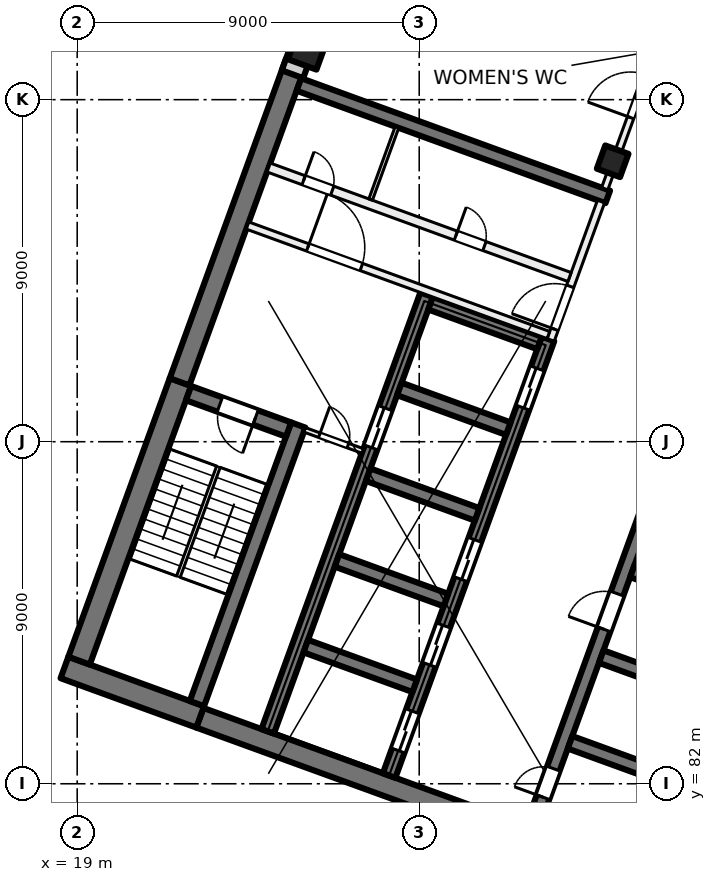
"""IFC4 building model, lengths in metres.
Left out: names, types, materials, properties, quantities, classifications, styles, units other than length and angle.
Written with IfcOpenShell. Run it as: python <this file> out.ifc"""

import sys

from ifc_helpers import new_model, si_unit, direction, frame, frame_2d, origin, origin_2d, place, context, subcontext, project, spatial, rectangle, extrude, element, fill, save


model = new_model("IFC4")
c1 = context("Model", 3, precision=1e-05, world=origin(), true_north=direction((0.0, 1.0)))
c2 = subcontext(c1, "Body", "Model", "MODEL_VIEW")
j1 = project(units=[si_unit("LENGTHUNIT", "METRE"), si_unit("PLANEANGLEUNIT", "RADIAN")], contexts=[c1])
p1 = place(None, origin())
s1 = spatial("IfcSite", under=j1, at=p1, CompositionType="ELEMENT")
p2 = place(p1, origin())
s2 = spatial("IfcBuilding", under=s1, at=p2, CompositionType="ELEMENT")
p3 = place(p2, frame((0.0, 0.0, 170.5)))
s3 = spatial("IfcBuildingStorey", under=s2, at=p3, CompositionType="ELEMENT", Elevation=170.5)
p4 = place(p3, frame((33.091, 98.379, 0.0), z_axis=(0.0, 0.0, 1.0), x_axis=(-0.342020143326, -0.939692620786, 0.0)))
e1 = element("IfcColumn", 1, at=p4, inside=s3, PredefinedType="COLUMN", context=c2, shape_type="SweptSolid", body=[
    extrude(rectangle(XDim=0.65, YDim=0.65, at=origin_2d()), origin(), (0.0, 0.0, 1.0), 4.0),
])
p5 = place(p3, frame((25.056, 101.303, 0.0), z_axis=(0.0, 0.0, 1.0), x_axis=(-0.342020143326, -0.939692620786, 0.0)))
e2 = element("IfcColumn", 2, at=p5, inside=s3, PredefinedType="COLUMN", context=c2, shape_type="SweptSolid", body=[
    extrude(rectangle(XDim=0.8, YDim=0.8, at=origin_2d()), origin(), (0.0, 0.0, 1.0), 4.0),
])
p6 = place(p3, frame((35.759, 78.811, 0.0), z_axis=(0.0, 0.0, 1.0), x_axis=(-0.939692894512, 0.342019391267, 0.0)))
e3 = element("IfcWall", 3, at=p6, inside=s3, PredefinedType="SHEAR", context=c2, shape_type="SweptSolid", body=[
    extrude(rectangle(XDim=14.4, YDim=0.55, at=frame_2d((7.2, 0.0))), origin(), (0.0, 0.0, 1.0), 4.0),
])
p7 = place(p3, frame((22.236, 83.76, 0.0), z_axis=(0.0, 0.0, 1.0), x_axis=(-0.939680822529, 0.342052557032, 0.0)))
e4 = element("IfcWall", 4, at=p7, inside=s3, PredefinedType="SHEAR", context=c2, shape_type="SweptSolid", body=[
    extrude(rectangle(XDim=3.8, YDim=0.6, at=frame_2d((1.9, 0.0))), origin(), (0.0, 0.0, 1.0), 4.0),
])
p8 = place(p3, frame((19.05, 85.239, 0.0), z_axis=(0.0, 0.0, 1.0), x_axis=(0.342016982193, 0.939693771338, 0.0)))
e5 = element("IfcWall", 5, at=p8, inside=s3, PredefinedType="SHEAR", context=c2, shape_type="SweptSolid", body=[
    extrude(rectangle(XDim=7.8, YDim=0.6, at=frame_2d((3.9, 0.0))), origin(), (0.0, 0.0, 1.0), 4.0),
])
p9 = place(p3, frame((21.694, 92.577, 0.0), z_axis=(0.0, 0.0, 1.0), x_axis=(0.342010253184, 0.939696220444, 0.0)))
e6 = element("IfcWall", 6, at=p9, inside=s3, PredefinedType="SHEAR", context=c2, shape_type="SweptSolid", body=[
    extrude(rectangle(XDim=8.95, YDim=0.55, at=frame_2d((4.475, 0.0))), origin(), (0.0, 0.0, 1.0), 4.0),
])
p10 = place(p3, frame((22.15, 84.11, 0.0), z_axis=(0.0, 0.0, 1.0), x_axis=(0.342016982193, 0.939693771338, 0.0)))
e7 = element("IfcWall", 7, at=p10, inside=s3, PredefinedType="SHEAR", context=c2, shape_type="SweptSolid", body=[
    extrude(rectangle(XDim=7.8, YDim=0.4, at=frame_2d((3.9, 0.0))), origin(), (0.0, 0.0, 1.0), 4.0),
])
p11 = place(p3, frame((24.562, 91.32, 0.0), z_axis=(0.0, 0.0, 1.0), x_axis=(-0.939717030584, 0.341953070509, 0.0)))
e8 = element("IfcWall", 8, at=p11, inside=s3, PredefinedType="SHEAR", context=c2, shape_type="SweptSolid", body=[
    extrude(rectangle(XDim=2.8, YDim=0.4, at=frame_2d((1.4, 0.0))), origin(), (0.0, 0.0, 1.0), 4.0),
])
p12 = place(p11, frame((0.925, 0.0, 0.0)))
e9 = element("IfcOpeningElement", 9, at=p12, cuts=e8, PredefinedType="OPENING", context=c2, shape_type="SweptSolid", body=[
    extrude(rectangle(XDim=1.0, YDim=2.1, at=frame_2d((0.5, 1.05))), frame((0.0, 0.21, 0.0), z_axis=(0.0, -1.0, 0.0), x_axis=(1.0, 0.0, 0.0)), (0.0, 0.0, 1.0), 0.42),
])
p13 = place(p3, frame((30.967, 80.848, 0.0), z_axis=(0.0, 0.0, 1.0), x_axis=(0.34201563943, 0.939694260058, 0.0)))
e10 = element("IfcWall", 10, at=p13, inside=s3, PredefinedType="SHEAR", context=c2, shape_type="SweptSolid", body=[
    extrude(rectangle(XDim=12.225, YDim=0.35, at=frame_2d((6.113, 0.0))), origin(), (0.0, 0.0, 1.0), 4.0),
])
p14 = place(p13, frame((0.85, 0.0, 0.0)))
e11 = element("IfcOpeningElement", 11, at=p14, cuts=e10, PredefinedType="OPENING", context=c2, shape_type="SweptSolid", body=[
    extrude(rectangle(XDim=0.8, YDim=2.1, at=frame_2d((0.4, 1.05))), frame((0.0, 0.185, 0.0), z_axis=(0.0, -1.0, 0.0), x_axis=(1.0, 0.0, 0.0)), (0.0, 0.0, 1.0), 0.37),
])
p15 = place(p13, frame((5.55, 0.0, 0.0)))
e12 = element("IfcOpeningElement", 12, at=p15, cuts=e10, PredefinedType="OPENING", context=c2, shape_type="SweptSolid", body=[
    extrude(rectangle(XDim=1.0, YDim=2.1, at=frame_2d((0.5, 1.05))), frame((0.0, 0.185, 0.0), z_axis=(0.0, -1.0, 0.0), x_axis=(1.0, 0.0, 0.0)), (0.0, 0.0, 1.0), 0.37),
])
p16 = place(p3, frame((34.835, 82.047, 0.0), z_axis=(0.0, 0.0, 1.0), x_axis=(-0.939683528043, 0.3420451244, 0.0)))
e13 = element("IfcWall", 13, at=p16, inside=s3, PredefinedType="SHEAR", context=c2, shape_type="SweptSolid", body=[
    extrude(rectangle(XDim=3.05, YDim=0.35, at=frame_2d((1.525, 0.0))), origin(), (0.0, 0.0, 1.0), 4.0),
])
p17 = place(p3, frame((35.656, 84.303, 0.0), z_axis=(0.0, 0.0, 1.0), x_axis=(-0.939709254651, 0.341974438698, 0.0)))
e14 = element("IfcWall", 14, at=p17, inside=s3, PredefinedType="SHEAR", context=c2, shape_type="SweptSolid", body=[
    extrude(rectangle(XDim=3.05, YDim=0.35, at=frame_2d((1.525, 0.0))), origin(), (0.0, 0.0, 1.0), 4.0),
])
p18 = place(p3, frame((36.477, 86.558, 0.0), z_axis=(0.0, 0.0, 1.0), x_axis=(-0.939683528043, 0.3420451244, 0.0)))
e15 = element("IfcWall", 15, at=p18, inside=s3, PredefinedType="SHEAR", context=c2, shape_type="SweptSolid", body=[
    extrude(rectangle(XDim=3.05, YDim=0.35, at=frame_2d((1.525, 0.0))), origin(), (0.0, 0.0, 1.0), 4.0),
])
p19 = place(p3, frame((27.208, 82.216, 0.0), z_axis=(0.0, 0.0, 1.0), x_axis=(0.34201563943, 0.939694260058, 0.0)))
e16 = element("IfcWall", 16, at=p19, inside=s3, PredefinedType="SHEAR", context=c2, shape_type="SweptSolid", body=[
    extrude(rectangle(XDim=12.225, YDim=0.35, at=frame_2d((6.113, 0.0))), origin(), (0.0, 0.0, 1.0), 4.0),
])
p20 = place(p19, frame((0.7, 0.0, 0.0)))
e17 = element("IfcOpeningElement", 17, at=p20, cuts=e16, PredefinedType="OPENING", context=c2, shape_type="SweptSolid", body=[
    extrude(rectangle(XDim=1.1, YDim=2.1, at=frame_2d((0.55, 1.05))), frame((0.0, 0.185, 0.0), z_axis=(0.0, -1.0, 0.0), x_axis=(1.0, 0.0, 0.0)), (0.0, 0.0, 1.0), 0.37),
])
p21 = place(p19, frame((3.1, 0.0, 0.0)))
e18 = element("IfcOpeningElement", 18, at=p21, cuts=e16, PredefinedType="OPENING", context=c2, shape_type="SweptSolid", body=[
    extrude(rectangle(XDim=1.1, YDim=2.1, at=frame_2d((0.55, 1.05))), frame((0.0, 0.185, 0.0), z_axis=(0.0, -1.0, 0.0), x_axis=(1.0, 0.0, 0.0)), (0.0, 0.0, 1.0), 0.37),
])
p22 = place(p19, frame((5.5, 0.0, 0.0)))
e19 = element("IfcOpeningElement", 19, at=p22, cuts=e16, PredefinedType="OPENING", context=c2, shape_type="SweptSolid", body=[
    extrude(rectangle(XDim=1.1, YDim=2.1, at=frame_2d((0.55, 1.05))), frame((0.0, 0.185, 0.0), z_axis=(0.0, -1.0, 0.0), x_axis=(1.0, 0.0, 0.0)), (0.0, 0.0, 1.0), 0.37),
])
p23 = place(p19, frame((10.3, 0.0, 0.0)))
e20 = element("IfcOpeningElement", 20, at=p23, cuts=e16, PredefinedType="OPENING", context=c2, shape_type="SweptSolid", body=[
    extrude(rectangle(XDim=1.1, YDim=2.1, at=frame_2d((0.55, 1.05))), frame((0.0, 0.185, 0.0), z_axis=(0.0, -1.0, 0.0), x_axis=(1.0, 0.0, 0.0)), (0.0, 0.0, 1.0), 0.37),
])
p24 = place(p3, frame((24.013, 83.379, 0.0), z_axis=(0.0, 0.0, 1.0), x_axis=(0.34201563943, 0.939694260058, 0.0)))
e21 = element("IfcWall", 21, at=p24, inside=s3, PredefinedType="SHEAR", context=c2, shape_type="SweptSolid", body=[
    extrude(rectangle(XDim=12.225, YDim=0.35, at=frame_2d((6.113, 0.0))), origin(), (0.0, 0.0, 1.0), 4.0),
])
p25 = place(p24, frame((7.95, 0.0, 0.0)))
e22 = element("IfcOpeningElement", 22, at=p25, cuts=e21, PredefinedType="OPENING", context=c2, shape_type="SweptSolid", body=[
    extrude(rectangle(XDim=1.1, YDim=2.1, at=frame_2d((0.55, 1.05))), frame((0.0, 0.185, 0.0), z_axis=(0.0, -1.0, 0.0), x_axis=(1.0, 0.0, 0.0)), (0.0, 0.0, 1.0), 0.37),
])
for number, where, z_axis, x_axis in (
    (23, (27.881, 84.578, 0.0), (0.0, 0.0, 1.0), (-0.94, 0.342, 0.0)),
    (24, (28.702, 86.833, 0.0), (0.0, 0.0, 1.0), (-0.94, 0.342, 0.0)),
    (25, (29.523, 89.089, 0.0), (0.0, 0.0, 1.0), (-0.94, 0.342, 0.0)),
):
    element("IfcWall", number, at=place(p3, frame(where, z_axis=z_axis, x_axis=x_axis)), inside=s3, PredefinedType="SHEAR", context=c2, shape_type="SweptSolid", body=[
        extrude(rectangle(XDim=3.05, YDim=0.35, at=frame_2d((1.525, 0.0))), origin(), (0.0, 0.0, 1.0), 4.0),
    ])
p26 = place(p3, frame((30.344, 91.344, 0.0), z_axis=(0.0, 0.0, 1.0), x_axis=(-0.939709254651, 0.341974438698, 0.0)))
e26 = element("IfcWall", 26, at=p26, inside=s3, PredefinedType="SHEAR", context=c2, shape_type="SweptSolid", body=[
    extrude(rectangle(XDim=3.05, YDim=0.35, at=frame_2d((1.525, 0.0))), origin(), (0.0, 0.0, 1.0), 4.0),
])
p27 = place(p3, frame((31.165, 93.599, 0.0), z_axis=(0.0, 0.0, 1.0), x_axis=(-0.939683528043, 0.3420451244, 0.0)))
e27 = element("IfcWall", 27, at=p27, inside=s3, PredefinedType="SHEAR", context=c2, shape_type="SweptSolid", body=[
    extrude(rectangle(XDim=3.05, YDim=0.35, at=frame_2d((1.525, 0.0))), origin(), (0.0, 0.0, 1.0), 4.0),
])
p28 = place(p3, frame((32.962, 97.441, 0.0), z_axis=(0.0, 0.0, 1.0), x_axis=(-0.939689545667, 0.342028592028, 0.0)))
e28 = element("IfcWall", 28, at=p28, inside=s3, PredefinedType="SHEAR", context=c2, shape_type="SweptSolid", body=[
    extrude(rectangle(XDim=8.65, YDim=0.35, at=frame_2d((4.325, 0.0))), origin(), (0.0, 0.0, 1.0), 4.0),
])
p29 = place(p3, frame((24.666, 100.669, 0.0), z_axis=(0.0, 0.0, 1.0), x_axis=(0.34201964167, 0.939692803373, 0.0)))
e29 = element("IfcWall", 29, at=p29, inside=s3, PredefinedType="SOLIDWALL", context=c2, shape_type="SweptSolid", body=[
    extrude(rectangle(XDim=32.884, YDim=0.6, at=frame_2d((16.442, 0.0))), origin(), (0.0, 0.0, 1.0), 3.625),
])
p30 = place(p29, frame((1.48, 0.0, 0.9)))
e30 = element("IfcOpeningElement", 30, at=p30, cuts=e29, PredefinedType="OPENING", context=c2, shape_type="SweptSolid", body=[
    extrude(rectangle(XDim=3.0, YDim=2.4, at=frame_2d((1.5, 1.2))), frame((0.0, 0.31, 0.0), z_axis=(0.0, -1.0, 0.0), x_axis=(1.0, 0.0, 0.0)), (0.0, 0.0, 1.0), 0.62),
])
p31 = place(p29, frame((5.98, 0.0, 0.9)))
e31 = element("IfcOpeningElement", 31, at=p31, cuts=e29, PredefinedType="OPENING", context=c2, shape_type="SweptSolid", body=[
    extrude(rectangle(XDim=3.0, YDim=2.4, at=frame_2d((1.5, 1.2))), frame((0.0, 0.31, 0.0), z_axis=(0.0, -1.0, 0.0), x_axis=(1.0, 0.0, 0.0)), (0.0, 0.0, 1.0), 0.62),
])
p32 = place(p29, frame((10.48, 0.0, 0.9)))
e32 = element("IfcOpeningElement", 32, at=p32, cuts=e29, PredefinedType="OPENING", context=c2, shape_type="SweptSolid", body=[
    extrude(rectangle(XDim=3.0, YDim=2.4, at=frame_2d((1.5, 1.2))), frame((0.0, 0.31, 0.0), z_axis=(0.0, -1.0, 0.0), x_axis=(1.0, 0.0, 0.0)), (0.0, 0.0, 1.0), 0.62),
])
p33 = place(p29, frame((14.98, 0.0, 0.9)))
e33 = element("IfcOpeningElement", 33, at=p33, cuts=e29, PredefinedType="OPENING", context=c2, shape_type="SweptSolid", body=[
    extrude(rectangle(XDim=3.0, YDim=2.4, at=frame_2d((1.5, 1.2))), frame((0.0, 0.31, 0.0), z_axis=(0.0, -1.0, 0.0), x_axis=(1.0, 0.0, 0.0)), (0.0, 0.0, 1.0), 0.62),
])
p34 = place(p29, frame((19.48, 0.0, 0.9)))
e34 = element("IfcOpeningElement", 34, at=p34, cuts=e29, PredefinedType="OPENING", context=c2, shape_type="SweptSolid", body=[
    extrude(rectangle(XDim=3.0, YDim=2.4, at=frame_2d((1.5, 1.2))), frame((0.0, 0.31, 0.0), z_axis=(0.0, -1.0, 0.0), x_axis=(1.0, 0.0, 0.0)), (0.0, 0.0, 1.0), 0.62),
])
p35 = place(p29, frame((23.98, 0.0, 0.9)))
e35 = element("IfcOpeningElement", 35, at=p35, cuts=e29, PredefinedType="OPENING", context=c2, shape_type="SweptSolid", body=[
    extrude(rectangle(XDim=3.0, YDim=2.4, at=frame_2d((1.5, 1.2))), frame((0.0, 0.31, 0.0), z_axis=(0.0, -1.0, 0.0), x_axis=(1.0, 0.0, 0.0)), (0.0, 0.0, 1.0), 0.62),
])
p36 = place(p29, frame((28.48, 0.0, 0.9)))
e36 = element("IfcOpeningElement", 36, at=p36, cuts=e29, PredefinedType="OPENING", context=c2, shape_type="SweptSolid", body=[
    extrude(rectangle(XDim=3.0, YDim=2.4, at=frame_2d((1.5, 1.2))), frame((0.0, 0.31, 0.0), z_axis=(0.0, -1.0, 0.0), x_axis=(1.0, 0.0, 0.0)), (0.0, 0.0, 1.0), 0.62),
])
p37 = place(p3, frame((31.459, 93.678, 0.0), z_axis=(0.0, 0.0, 1.0), x_axis=(0.341985870128, 0.939705094502, 0.0)))
e37 = element("IfcWall", 37, at=p37, inside=s3, PredefinedType="PARTITIONING", context=c2, shape_type="SweptSolid", body=[
    extrude(rectangle(XDim=3.875, YDim=0.2, at=frame_2d((1.938, 0.0))), origin(), (0.0, 0.0, 1.0), 3.625),
])
p38 = place(p37, frame((0.3, 0.0, 0.0)))
e38 = element("IfcOpeningElement", 38, at=p38, cuts=e37, PredefinedType="OPENING", context=c2, shape_type="SweptSolid", body=[
    extrude(rectangle(XDim=1.2, YDim=2.1, at=frame_2d((0.6, 1.05))), frame((0.0, 0.11, 0.0), z_axis=(0.0, -1.0, 0.0), x_axis=(1.0, 0.0, 0.0)), (0.0, 0.0, 1.0), 0.22),
])
p39 = place(p3, frame((23.483, 96.688, 0.0), z_axis=(0.0, 0.0, 1.0), x_axis=(0.939691007314, -0.342024576271, 0.0)))
e39 = element("IfcWall", 39, at=p39, inside=s3, PredefinedType="PARTITIONING", context=c2, shape_type="SweptSolid", body=[
    extrude(rectangle(XDim=8.425, YDim=0.2, at=frame_2d((4.212, 0.0))), origin(), (0.0, 0.0, 1.0), 3.625),
])
p40 = place(p39, frame((1.688, 0.0, 0.0)))
e40 = element("IfcOpeningElement", 40, at=p40, cuts=e39, PredefinedType="OPENING", context=c2, shape_type="SweptSolid", body=[
    extrude(rectangle(XDim=1.5, YDim=2.1, at=frame_2d((0.75, 1.05))), frame((0.0, 0.11, 0.0), z_axis=(0.0, -1.0, 0.0), x_axis=(1.0, 0.0, 0.0)), (0.0, 0.0, 1.0), 0.22),
])
p41 = place(p3, frame((24.039, 98.215, 0.0), z_axis=(0.0, 0.0, 1.0), x_axis=(0.939687617333, -0.342033889887, 0.0)))
e41 = element("IfcWall", 41, at=p41, inside=s3, PredefinedType="PARTITIONING", context=c2, shape_type="SweptSolid", body=[
    extrude(rectangle(XDim=8.425, YDim=0.25, at=frame_2d((4.212, 0.0))), origin(), (0.0, 0.0, 1.0), 3.625),
])
p42 = place(p41, frame((5.242, 0.0, 0.0)))
e42 = element("IfcOpeningElement", 42, at=p42, cuts=e41, PredefinedType="OPENING", context=c2, shape_type="SweptSolid", body=[
    extrude(rectangle(XDim=0.8, YDim=2.1, at=frame_2d((0.4, 1.05))), frame((0.0, 0.135, 0.0), z_axis=(0.0, -1.0, 0.0), x_axis=(1.0, 0.0, 0.0)), (0.0, 0.0, 1.0), 0.27),
])
p43 = place(p41, frame((0.98, 0.0, 0.0)))
e43 = element("IfcOpeningElement", 43, at=p43, cuts=e41, PredefinedType="OPENING", context=c2, shape_type="SweptSolid", body=[
    extrude(rectangle(XDim=0.8, YDim=2.1, at=frame_2d((0.4, 1.05))), frame((0.0, 0.135, 0.0), z_axis=(0.0, -1.0, 0.0), x_axis=(1.0, 0.0, 0.0)), (0.0, 0.0, 1.0), 0.27),
])
p44 = place(p3, frame((24.985, 91.312, 0.0), z_axis=(0.0, 0.0, 1.0), x_axis=(0.939705651352, -0.341984340019, 0.0)))
e44 = element("IfcWall", 44, at=p44, inside=s3, PredefinedType="PARTITIONING", context=c2, shape_type="SweptSolid", body=[
    extrude(rectangle(XDim=1.625, YDim=0.125, at=frame_2d((0.812, 0.0))), origin(), (0.0, 0.0, 1.0), 3.625),
])
p45 = place(p44, frame((0.413, 0.0, 0.0)))
e45 = element("IfcOpeningElement", 45, at=p45, cuts=e44, PredefinedType="OPENING", context=c2, shape_type="SweptSolid", body=[
    extrude(rectangle(XDim=0.8, YDim=2.1, at=frame_2d((0.4, 1.05))), frame((0.0, 0.073, 0.0), z_axis=(0.0, -1.0, 0.0), x_axis=(1.0, 0.0, 0.0)), (0.0, 0.0, 1.0), 0.145),
])
p46 = place(p3, frame((26.722, 97.371, 0.0), z_axis=(0.0, 0.0, 1.0), x_axis=(0.342004391282, 0.939698353911, 0.0)))
e46 = element("IfcWall", 46, at=p46, inside=s3, PredefinedType="PARTITIONING", context=c2, shape_type="SweptSolid", body=[
    extrude(rectangle(XDim=2.025, YDim=0.1, at=frame_2d((1.013, 0.0))), origin(), (0.0, 0.0, 1.0), 3.625),
])
p47 = place(p3, frame((32.881, 97.657, 0.0), z_axis=(0.0, 0.0, 1.0), x_axis=(0.342058204353, 0.939678766832, 0.0)))
e47 = element("IfcWall", 47, at=p47, inside=s3, PredefinedType="PARTITIONING", context=c2, shape_type="SweptSolid", body=[
    extrude(rectangle(XDim=5.163, YDim=0.175, at=frame_2d((2.581, 0.0))), origin(), (0.0, 0.0, 1.0), 3.625),
])
p48 = place(p47, frame((1.991, 0.0, 0.0)))
e48 = element("IfcOpeningElement", 48, at=p48, cuts=e47, PredefinedType="OPENING", context=c2, shape_type="SweptSolid", body=[
    extrude(rectangle(XDim=1.2, YDim=2.1, at=frame_2d((0.6, 1.05))), frame((0.0, 0.097, 0.0), z_axis=(0.0, -1.0, 0.0), x_axis=(1.0, 0.0, 0.0)), (0.0, 0.0, 1.0), 0.195),
])
p49 = place(p20, origin())
e49 = element("IfcDoor", 49, at=p49, inside=s3, OperationType="DOUBLE_DOOR_SLIDING", PredefinedType="DOOR", context=c2, shape_type="SweptSolid", body=[
    extrude(rectangle(XDim=1.1, YDim=2.1, at=frame_2d((0.55, 1.05))), frame((0.0, 0.025, 0.0), z_axis=(0.0, -1.0, 0.0), x_axis=(1.0, 0.0, 0.0)), (0.0, 0.0, 1.0), 0.05),
])
fill(e17, e49)
p50 = place(p21, origin())
e50 = element("IfcDoor", 50, at=p50, inside=s3, OperationType="DOUBLE_DOOR_SLIDING", PredefinedType="DOOR", context=c2, shape_type="SweptSolid", body=[
    extrude(rectangle(XDim=1.1, YDim=2.1, at=frame_2d((0.55, 1.05))), frame((0.0, 0.025, 0.0), z_axis=(0.0, -1.0, 0.0), x_axis=(1.0, 0.0, 0.0)), (0.0, 0.0, 1.0), 0.05),
])
fill(e18, e50)
p51 = place(p22, origin())
e51 = element("IfcDoor", 51, at=p51, inside=s3, OperationType="DOUBLE_DOOR_SLIDING", PredefinedType="DOOR", context=c2, shape_type="SweptSolid", body=[
    extrude(rectangle(XDim=1.1, YDim=2.1, at=frame_2d((0.55, 1.05))), frame((0.0, 0.025, 0.0), z_axis=(0.0, -1.0, 0.0), x_axis=(1.0, 0.0, 0.0)), (0.0, 0.0, 1.0), 0.05),
])
fill(e19, e51)
p52 = place(p23, origin())
e52 = element("IfcDoor", 52, at=p52, inside=s3, OperationType="DOUBLE_DOOR_SLIDING", PredefinedType="DOOR", context=c2, shape_type="SweptSolid", body=[
    extrude(rectangle(XDim=1.1, YDim=2.1, at=frame_2d((0.55, 1.05))), frame((0.0, 0.025, 0.0), z_axis=(0.0, -1.0, 0.0), x_axis=(1.0, 0.0, 0.0)), (0.0, 0.0, 1.0), 0.05),
])
fill(e20, e52)
p53 = place(p14, origin())
e53 = element("IfcDoor", 53, at=p53, inside=s3, OperationType="SINGLE_SWING_LEFT", PredefinedType="DOOR", context=c2, shape_type="SweptSolid", body=[
    extrude(rectangle(XDim=0.8, YDim=2.1, at=frame_2d((0.4, 1.05))), frame((0.0, 0.025, 0.0), z_axis=(0.0, -1.0, 0.0), x_axis=(1.0, 0.0, 0.0)), (0.0, 0.0, 1.0), 0.05),
])
fill(e11, e53)
p54 = place(p15, origin())
e54 = element("IfcDoor", 54, at=p54, inside=s3, OperationType="SINGLE_SWING_RIGHT", PredefinedType="DOOR", context=c2, shape_type="SweptSolid", body=[
    extrude(rectangle(XDim=1.0, YDim=2.1, at=frame_2d((0.5, 1.05))), frame((0.0, 0.025, 0.0), z_axis=(0.0, -1.0, 0.0), x_axis=(1.0, 0.0, 0.0)), (0.0, 0.0, 1.0), 0.05),
])
fill(e12, e54)
p55 = place(p38, origin())
e55 = element("IfcDoor", 55, at=p55, inside=s3, OperationType="DOUBLE_DOOR_SINGLE_SWING", PredefinedType="DOOR", context=c2, shape_type="SweptSolid", body=[
    extrude(rectangle(XDim=1.2, YDim=2.1, at=frame_2d((0.6, 1.05))), frame((0.0, 0.025, 0.0), z_axis=(0.0, -1.0, 0.0), x_axis=(1.0, 0.0, 0.0)), (0.0, 0.0, 1.0), 0.05),
])
fill(e38, e55)
p56 = place(p40, origin())
e56 = element("IfcDoor", 56, at=p56, inside=s3, OperationType="DOUBLE_DOOR_SINGLE_SWING", PredefinedType="DOOR", context=c2, shape_type="SweptSolid", body=[
    extrude(rectangle(XDim=1.5, YDim=2.1, at=frame_2d((0.75, 1.05))), frame((0.0, 0.025, 0.0), z_axis=(0.0, -1.0, 0.0), x_axis=(1.0, 0.0, 0.0)), (0.0, 0.0, 1.0), 0.05),
])
fill(e40, e56)
p57 = place(p12, origin())
e57 = element("IfcDoor", 57, at=p57, inside=s3, OperationType="SINGLE_SWING_LEFT", PredefinedType="DOOR", context=c2, shape_type="SweptSolid", body=[
    extrude(rectangle(XDim=1.0, YDim=2.1, at=frame_2d((0.5, 1.05))), frame((0.0, 0.025, 0.0), z_axis=(0.0, -1.0, 0.0), x_axis=(1.0, 0.0, 0.0)), (0.0, 0.0, 1.0), 0.05),
])
fill(e9, e57)
p58 = place(p45, origin())
e58 = element("IfcDoor", 58, at=p58, inside=s3, OperationType="SINGLE_SWING_RIGHT", PredefinedType="DOOR", context=c2, shape_type="SweptSolid", body=[
    extrude(rectangle(XDim=0.8, YDim=2.1, at=frame_2d((0.4, 1.05))), frame((0.0, 0.025, 0.0), z_axis=(0.0, -1.0, 0.0), x_axis=(1.0, 0.0, 0.0)), (0.0, 0.0, 1.0), 0.05),
])
fill(e45, e58)
p59 = place(p42, origin())
e59 = element("IfcDoor", 59, at=p59, inside=s3, OperationType="SINGLE_SWING_LEFT", PredefinedType="DOOR", context=c2, shape_type="SweptSolid", body=[
    extrude(rectangle(XDim=0.8, YDim=2.1, at=frame_2d((0.4, 1.05))), frame((0.0, 0.025, 0.0), z_axis=(0.0, -1.0, 0.0), x_axis=(1.0, 0.0, 0.0)), (0.0, 0.0, 1.0), 0.05),
])
fill(e42, e59)
p60 = place(p43, origin())
e60 = element("IfcDoor", 60, at=p60, inside=s3, OperationType="SINGLE_SWING_RIGHT", PredefinedType="DOOR", context=c2, shape_type="SweptSolid", body=[
    extrude(rectangle(XDim=0.8, YDim=2.1, at=frame_2d((0.4, 1.05))), frame((0.0, 0.025, 0.0), z_axis=(0.0, -1.0, 0.0), x_axis=(1.0, 0.0, 0.0)), (0.0, 0.0, 1.0), 0.05),
])
fill(e43, e60)
p61 = place(p25, origin())
e61 = element("IfcDoor", 61, at=p61, inside=s3, OperationType="DOUBLE_DOOR_SLIDING", PredefinedType="DOOR", context=c2, shape_type="SweptSolid", body=[
    extrude(rectangle(XDim=1.1, YDim=2.1, at=frame_2d((0.55, 1.05))), frame((0.0, 0.025, 0.0), z_axis=(0.0, -1.0, 0.0), x_axis=(1.0, 0.0, 0.0)), (0.0, 0.0, 1.0), 0.05),
])
fill(e22, e61)
p62 = place(p48, origin())
e62 = element("IfcDoor", 62, at=p62, inside=s3, OperationType="DOUBLE_DOOR_SINGLE_SWING", PredefinedType="DOOR", context=c2, shape_type="SweptSolid", body=[
    extrude(rectangle(XDim=1.2, YDim=2.1, at=frame_2d((0.6, 1.05))), frame((0.0, 0.025, 0.0), z_axis=(0.0, -1.0, 0.0), x_axis=(1.0, 0.0, 0.0)), (0.0, 0.0, 1.0), 0.05),
])
fill(e48, e62)
save(model, sys.argv[1])
